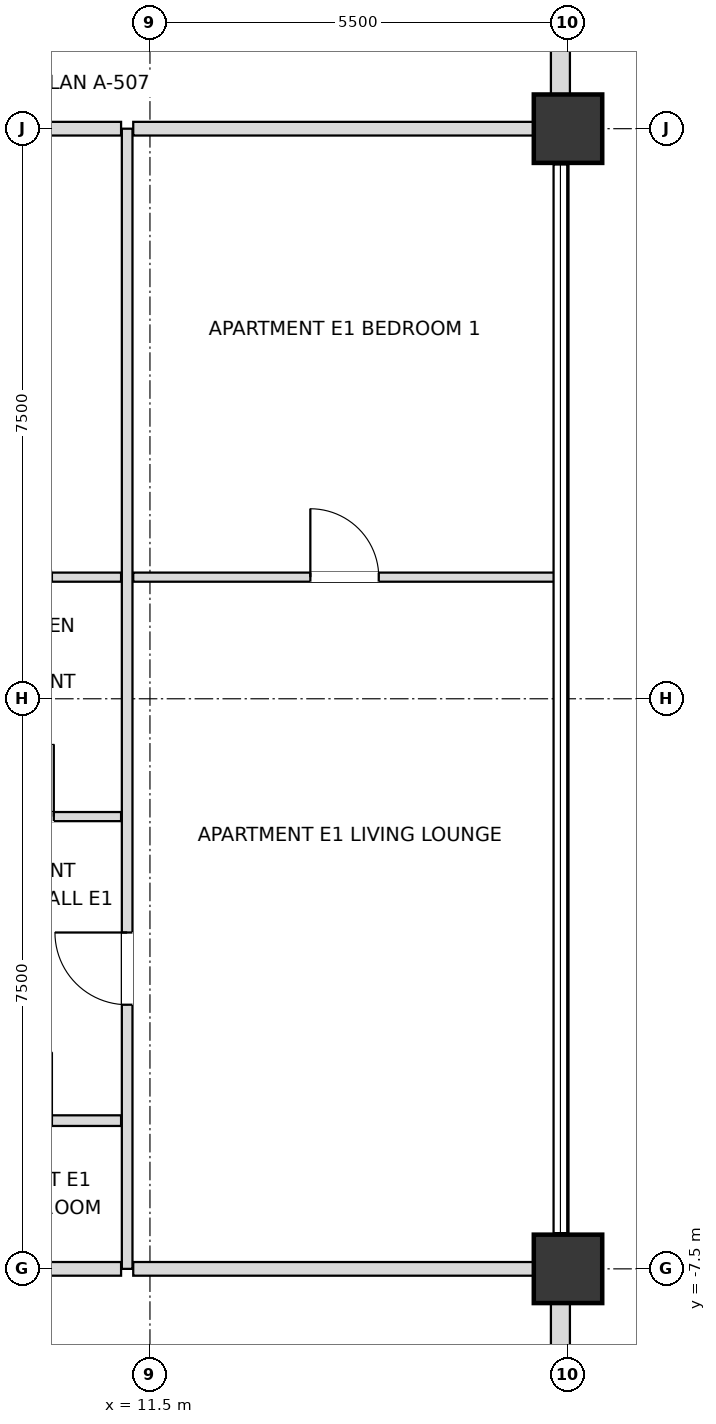
"""IFC4 building model, lengths in metres.
Left out: names, types, materials, properties, quantities, classifications, styles, units other than length and angle.
Written with IfcOpenShell. Run it as: python <this file> out.ifc"""

import sys

from ifc_helpers import new_model, si_unit, direction, frame, frame_2d, origin, origin_2d, place, context, subcontext, project, spatial, rectangle, extrude, element, fill, save


model = new_model("IFC4")
c1 = context("Model", 3, precision=1e-05, world=origin(), true_north=direction((0.0, 1.0)))
c2 = subcontext(c1, "Body", "Model", "MODEL_VIEW")
j1 = project(units=[si_unit("LENGTHUNIT", "METRE"), si_unit("PLANEANGLEUNIT", "RADIAN")], contexts=[c1])
p1 = place(None, origin())
s1 = spatial("IfcSite", under=j1, at=p1, CompositionType="ELEMENT")
p2 = place(p1, origin())
s2 = spatial("IfcBuilding", under=s1, at=p2, CompositionType="ELEMENT")
p3 = place(p2, frame((0.0, 0.0, 276.3)))
s3 = spatial("IfcBuildingStorey", under=s2, at=p3, CompositionType="ELEMENT", Elevation=276.3)
for number, where, z_axis, x_axis in (
    (1, (17.0, -7.5, 0.0), (0.0, 0.0, 1.0), (1.0, 0.0, 0.0)),
    (2, (17.0, 7.5, 0.0), (0.0, 0.0, 1.0), (1.0, 0.0, 0.0)),
):
    element("IfcColumn", number, at=place(p3, frame(where, z_axis=z_axis, x_axis=x_axis)), inside=s3, PredefinedType="USERDEFINED", context=c2, shape_type="SweptSolid", body=[
        extrude(rectangle(XDim=0.9, YDim=0.9, at=origin_2d()), origin(), (0.0, 0.0, 1.0), 3.6),
    ])
p4 = place(p3, frame((16.9, -12.555, 0.0), z_axis=(0.0, 0.0, 1.0), x_axis=(0.0, 1.0, 0.0)))
e3 = element("IfcWall", 3, at=p4, inside=s3, PredefinedType="SOLIDWALL", context=c2, shape_type="SweptSolid", body=[
    extrude(rectangle(XDim=4.61, YDim=0.25, at=frame_2d((2.305, 0.0))), origin(), (0.0, 0.0, 1.0), 2.748),
])
p5 = place(p4, frame((1.405, 0.0, 0.72)))
e4 = element("IfcOpeningElement", 4, at=p5, cuts=e3, PredefinedType="OPENING", context=c2, shape_type="SweptSolid", body=[
    extrude(rectangle(XDim=1.8, YDim=1.68, at=frame_2d((0.9, 0.84))), frame((0.0, 0.135, 0.0), z_axis=(0.0, -1.0, 0.0), x_axis=(1.0, 0.0, 0.0)), (0.0, 0.0, 1.0), 0.27),
])
p6 = place(p3, frame((16.9, 7.945, 0.0), z_axis=(0.0, 0.0, 1.0), x_axis=(0.0, 1.0, 0.0)))
e5 = element("IfcWall", 5, at=p6, inside=s3, PredefinedType="SOLIDWALL", context=c2, shape_type="SweptSolid", body=[
    extrude(rectangle(XDim=4.61, YDim=0.25, at=frame_2d((2.305, 0.0))), origin(), (0.0, 0.0, 1.0), 2.748),
])
p7 = place(p6, frame((1.405, 0.0, 0.72)))
e6 = element("IfcOpeningElement", 6, at=p7, cuts=e5, PredefinedType="OPENING", context=c2, shape_type="SweptSolid", body=[
    extrude(rectangle(XDim=1.8, YDim=1.68, at=frame_2d((0.9, 0.84))), frame((0.0, 0.135, 0.0), z_axis=(0.0, -1.0, 0.0), x_axis=(1.0, 0.0, 0.0)), (0.0, 0.0, 1.0), 0.27),
])
p8 = place(p3, frame((11.2, -7.5, 0.0), z_axis=(0.0, 0.0, 1.0), x_axis=(0.0, 1.0, 0.0)))
e7 = element("IfcWall", 7, at=p8, inside=s3, PredefinedType="PARTITIONING", context=c2, shape_type="SweptSolid", body=[
    extrude(rectangle(XDim=15.0, YDim=0.14, at=frame_2d((7.5, 0.0))), origin(), (0.0, 0.0, 1.0), 3.38),
])
p9 = place(p8, frame((3.475, 0.0, 0.0)))
e8 = element("IfcOpeningElement", 8, at=p9, cuts=e7, PredefinedType="OPENING", context=c2, shape_type="SweptSolid", body=[
    extrude(rectangle(XDim=0.95, YDim=2.1, at=frame_2d((0.475, 1.05))), frame((0.0, 0.08, 0.0), z_axis=(0.0, -1.0, 0.0), x_axis=(1.0, 0.0, 0.0)), (0.0, 0.0, 1.0), 0.16),
])
p10 = place(p3, frame((8.38, -7.5, 0.0), z_axis=(0.0, 0.0, 1.0), x_axis=(1.0, 0.0, 0.0)))
e9 = element("IfcWall", 9, at=p10, inside=s3, PredefinedType="PARTITIONING", context=c2, shape_type="SweptSolid", body=[
    extrude(rectangle(XDim=2.74, YDim=0.18, at=frame_2d((1.37, 0.0))), origin(), (0.0, 0.0, 1.0), 2.826),
])
p11 = place(p3, frame((11.28, -7.5, 0.0), z_axis=(0.0, 0.0, 1.0), x_axis=(1.0, 0.0, 0.0)))
e10 = element("IfcWall", 10, at=p11, inside=s3, PredefinedType="PARTITIONING", context=c2, shape_type="SweptSolid", body=[
    extrude(rectangle(XDim=5.62, YDim=0.18, at=frame_2d((2.81, 0.0))), origin(), (0.0, 0.0, 1.0), 2.826),
])
p12 = place(p3, frame((8.38, -5.55, 0.0), z_axis=(0.0, 0.0, 1.0), x_axis=(1.0, 0.0, 0.0)))
e11 = element("IfcWall", 11, at=p12, inside=s3, PredefinedType="PARTITIONING", context=c2, shape_type="SweptSolid", body=[
    extrude(rectangle(XDim=2.74, YDim=0.14, at=frame_2d((1.37, 0.0))), origin(), (0.0, 0.0, 1.0), 3.38),
])
p13 = place(p12, frame((0.93, 0.0, 0.0)))
e12 = element("IfcOpeningElement", 12, at=p13, cuts=e11, PredefinedType="OPENING", context=c2, shape_type="SweptSolid", body=[
    extrude(rectangle(XDim=0.9, YDim=2.1, at=frame_2d((0.45, 1.05))), frame((0.0, 0.08, 0.0), z_axis=(0.0, -1.0, 0.0), x_axis=(1.0, 0.0, 0.0)), (0.0, 0.0, 1.0), 0.16),
])
p14 = place(p3, frame((8.38, -1.55, 0.0), z_axis=(0.0, 0.0, 1.0), x_axis=(1.0, 0.0, 0.0)))
e13 = element("IfcWall", 13, at=p14, inside=s3, PredefinedType="PARTITIONING", context=c2, shape_type="SweptSolid", body=[
    extrude(rectangle(XDim=2.74, YDim=0.12, at=frame_2d((1.37, 0.0))), origin(), (0.0, 0.0, 1.0), 3.38),
])
p15 = place(p14, frame((0.905, 0.0, 0.0)))
e14 = element("IfcOpeningElement", 14, at=p15, cuts=e13, PredefinedType="OPENING", context=c2, shape_type="SweptSolid", body=[
    extrude(rectangle(XDim=0.95, YDim=2.1, at=frame_2d((0.475, 1.05))), frame((0.0, 0.07, 0.0), z_axis=(0.0, -1.0, 0.0), x_axis=(1.0, 0.0, 0.0)), (0.0, 0.0, 1.0), 0.14),
])
p16 = place(p3, frame((8.38, 1.6, 0.0), z_axis=(0.0, 0.0, 1.0), x_axis=(1.0, 0.0, 0.0)))
e15 = element("IfcWall", 15, at=p16, inside=s3, PredefinedType="PARTITIONING", context=c2, shape_type="SweptSolid", body=[
    extrude(rectangle(XDim=2.74, YDim=0.12, at=frame_2d((1.37, 0.0))), origin(), (0.0, 0.0, 1.0), 3.38),
])
p17 = place(p16, frame((0.93, 0.0, 0.0)))
e16 = element("IfcOpeningElement", 16, at=p17, cuts=e15, PredefinedType="OPENING", context=c2, shape_type="SweptSolid", body=[
    extrude(rectangle(XDim=0.9, YDim=2.1, at=frame_2d((0.45, 1.05))), frame((0.0, 0.07, 0.0), z_axis=(0.0, -1.0, 0.0), x_axis=(1.0, 0.0, 0.0)), (0.0, 0.0, 1.0), 0.14),
])
p18 = place(p3, frame((11.28, 1.6, 0.0), z_axis=(0.0, 0.0, 1.0), x_axis=(1.0, 0.0, 0.0)))
e17 = element("IfcWall", 17, at=p18, inside=s3, PredefinedType="PARTITIONING", context=c2, shape_type="SweptSolid", body=[
    extrude(rectangle(XDim=5.54, YDim=0.12, at=frame_2d((2.77, 0.0))), origin(), (0.0, 0.0, 1.0), 3.018),
])
p19 = place(p18, frame((2.33, 0.0, 0.0)))
e18 = element("IfcOpeningElement", 18, at=p19, cuts=e17, PredefinedType="OPENING", context=c2, shape_type="SweptSolid", body=[
    extrude(rectangle(XDim=0.9, YDim=2.1, at=frame_2d((0.45, 1.05))), frame((0.0, 0.07, 0.0), z_axis=(0.0, -1.0, 0.0), x_axis=(1.0, 0.0, 0.0)), (0.0, 0.0, 1.0), 0.14),
])
p20 = place(p3, frame((8.38, 7.5, 0.0), z_axis=(0.0, 0.0, 1.0), x_axis=(1.0, 0.0, 0.0)))
e19 = element("IfcWall", 19, at=p20, inside=s3, PredefinedType="PARTITIONING", context=c2, shape_type="SweptSolid", body=[
    extrude(rectangle(XDim=2.74, YDim=0.18, at=frame_2d((1.37, 0.0))), origin(), (0.0, 0.0, 1.0), 2.826),
])
p21 = place(p3, frame((11.28, 7.5, 0.0), z_axis=(0.0, 0.0, 1.0), x_axis=(1.0, 0.0, 0.0)))
e20 = element("IfcWall", 20, at=p21, inside=s3, PredefinedType="PARTITIONING", context=c2, shape_type="SweptSolid", body=[
    extrude(rectangle(XDim=5.62, YDim=0.18, at=frame_2d((2.81, 0.0))), origin(), (0.0, 0.0, 1.0), 2.826),
])
p22 = place(p15, origin())
e21 = element("IfcDoor", 21, at=p22, inside=s3, OperationType="SINGLE_SWING_RIGHT", PredefinedType="DOOR", context=c2, shape_type="SweptSolid", body=[
    extrude(rectangle(XDim=0.95, YDim=2.1, at=frame_2d((0.475, 1.05))), frame((0.0, 0.025, 0.0), z_axis=(0.0, -1.0, 0.0), x_axis=(1.0, 0.0, 0.0)), (0.0, 0.0, 1.0), 0.05),
])
fill(e14, e21)
p23 = place(p9, origin())
e22 = element("IfcDoor", 22, at=p23, inside=s3, OperationType="SINGLE_SWING_RIGHT", PredefinedType="DOOR", context=c2, shape_type="SweptSolid", body=[
    extrude(rectangle(XDim=0.95, YDim=2.1, at=frame_2d((0.475, 1.05))), frame((0.0, 0.025, 0.0), z_axis=(0.0, -1.0, 0.0), x_axis=(1.0, 0.0, 0.0)), (0.0, 0.0, 1.0), 0.05),
])
fill(e8, e22)
p24 = place(p19, origin())
e23 = element("IfcDoor", 23, at=p24, inside=s3, OperationType="SINGLE_SWING_LEFT", PredefinedType="DOOR", context=c2, shape_type="SweptSolid", body=[
    extrude(rectangle(XDim=0.9, YDim=2.1, at=frame_2d((0.45, 1.05))), frame((0.0, 0.025, 0.0), z_axis=(0.0, -1.0, 0.0), x_axis=(1.0, 0.0, 0.0)), (0.0, 0.0, 1.0), 0.05),
])
fill(e18, e23)
save(model, sys.argv[1])
